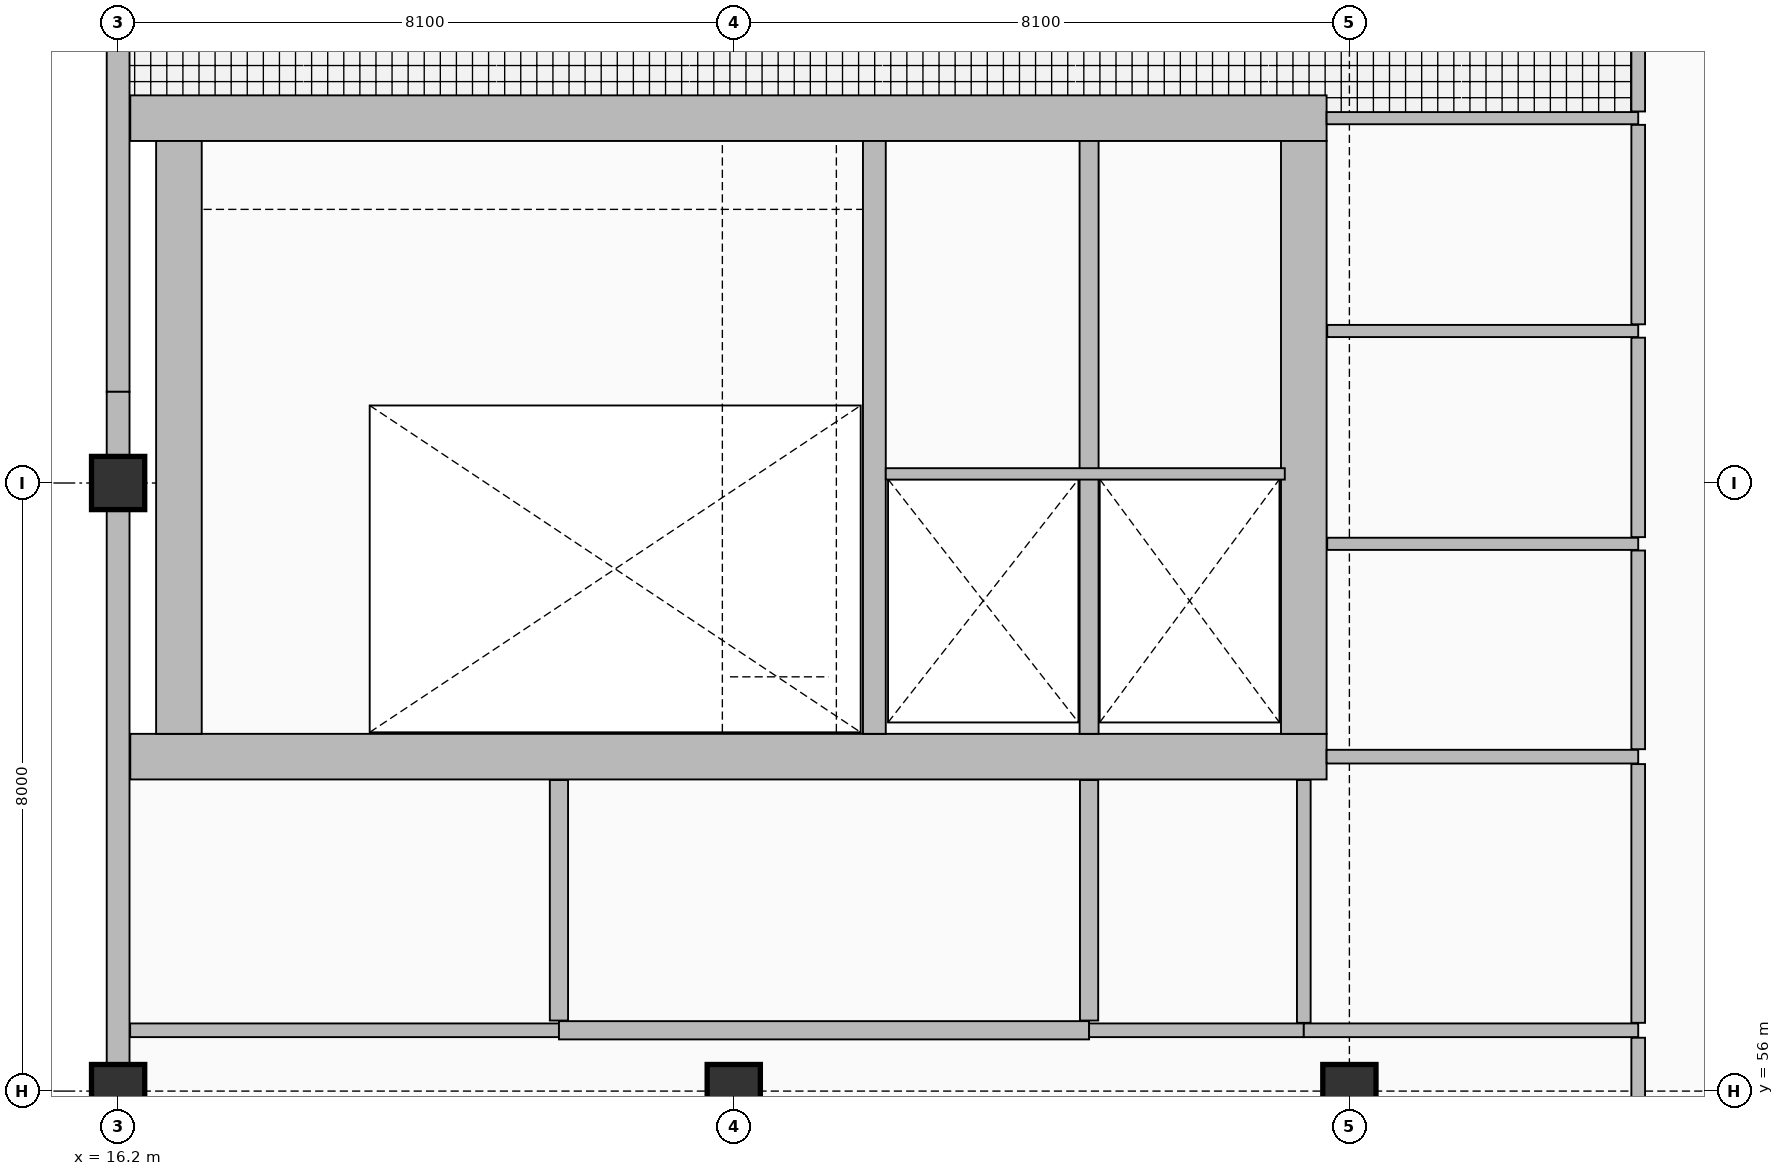
"""IFC4 building model, lengths in metres.
Left out: names, types, materials, properties, quantities, classifications, styles, units other than length and angle.
Written with IfcOpenShell. Run it as: python <this file> out.ifc"""

import sys

from ifc_helpers import new_model, si_unit, direction, frame, frame_2d, origin, origin_2d, place, context, subcontext, project, spatial, rectangle, extrude, element, fill, save


model = new_model("IFC4")
c1 = context("Model", 3, precision=1e-05, world=origin(), true_north=direction((0.0, 1.0)))
c2 = subcontext(c1, "Body", "Model", "MODEL_VIEW")
j1 = project(units=[si_unit("LENGTHUNIT", "METRE"), si_unit("PLANEANGLEUNIT", "RADIAN")], contexts=[c1])
p1 = place(None, origin())
s1 = spatial("IfcSite", under=j1, at=p1, CompositionType="ELEMENT")
p2 = place(p1, origin())
s2 = spatial("IfcBuilding", under=s1, at=p2, CompositionType="ELEMENT")
p3 = place(p2, frame((0.0, 0.0, 5.4)))
s3 = spatial("IfcBuildingStorey", under=s2, at=p3, CompositionType="ELEMENT", Elevation=5.4)
p4 = place(p3, frame((16.36, 60.4, 0.0), z_axis=(0.0, 0.0, 1.0), x_axis=(1.0, 0.0, 0.0)))
e1 = element("IfcWall", 1, at=p4, inside=s3, PredefinedType="SHEAR", context=c2, shape_type="SweptSolid", body=[
    extrude(rectangle(XDim=15.74, YDim=0.6, at=frame_2d((7.87, 0.0))), origin(), (0.0, 0.0, 1.0), 4.8),
])
p5 = place(p4, frame((1.39, 0.0, 0.0)))
e2 = element("IfcOpeningElement", 2, at=p5, cuts=e1, PredefinedType="OPENING", context=c2, shape_type="SweptSolid", body=[
    extrude(rectangle(XDim=1.15, YDim=2.25, at=frame_2d((0.575, 1.125))), frame((0.0, 0.31, 0.0), z_axis=(0.0, -1.0, 0.0), x_axis=(1.0, 0.0, 0.0)), (0.0, 0.0, 1.0), 0.62),
])
p6 = place(p4, frame((10.673, 0.0, 0.0)))
e3 = element("IfcOpeningElement", 3, at=p6, cuts=e1, PredefinedType="OPENING", context=c2, shape_type="SweptSolid", body=[
    extrude(rectangle(XDim=1.1, YDim=2.2, at=frame_2d((0.55, 1.1))), frame((0.0, 0.31, 0.0), z_axis=(0.0, -1.0, 0.0), x_axis=(1.0, 0.0, 0.0)), (0.0, 0.0, 1.0), 0.62),
])
p7 = place(p4, frame((13.387, 0.0, 0.0)))
e4 = element("IfcOpeningElement", 4, at=p7, cuts=e1, PredefinedType="OPENING", context=c2, shape_type="SweptSolid", body=[
    extrude(rectangle(XDim=1.1, YDim=2.2, at=frame_2d((0.55, 1.1))), frame((0.0, 0.31, 0.0), z_axis=(0.0, -1.0, 0.0), x_axis=(1.0, 0.0, 0.0)), (0.0, 0.0, 1.0), 0.62),
])
p8 = place(p3, frame((16.36, 68.8, 0.0), z_axis=(0.0, 0.0, 1.0), x_axis=(1.0, 0.0, 0.0)))
e5 = element("IfcWall", 5, at=p8, inside=s3, PredefinedType="SHEAR", context=c2, shape_type="SweptSolid", body=[
    extrude(rectangle(XDim=15.74, YDim=0.6, at=frame_2d((7.87, 0.0))), origin(), (0.0, 0.0, 1.0), 4.8),
])
for number, where, z_axis, x_axis in (
    (6, (17.0, 60.7, 0.0), (0.0, 0.0, 1.0), (0.0, 1.0, 0.0)),
    (7, (31.8, 60.7, 0.0), (0.0, 0.0, 1.0), (0.0, 1.0, 0.0)),
):
    element("IfcWall", number, at=place(p3, frame(where, z_axis=z_axis, x_axis=x_axis)), inside=s3, PredefinedType="SHEAR", context=c2, shape_type="SweptSolid", body=[
        extrude(rectangle(XDim=7.8, YDim=0.6, at=frame_2d((3.9, 0.0))), origin(), (0.0, 0.0, 1.0), 4.8),
    ])
p9 = place(p3, frame((26.15, 60.7, 0.0), z_axis=(0.0, 0.0, 1.0), x_axis=(0.0, 1.0, 0.0)))
e8 = element("IfcWall", 8, at=p9, inside=s3, PredefinedType="SHEAR", context=c2, shape_type="SweptSolid", body=[
    extrude(rectangle(XDim=7.8, YDim=0.3, at=frame_2d((3.9, 0.0))), origin(), (0.0, 0.0, 1.0), 4.8),
])
p10 = place(p3, frame((28.975, 60.7, 0.0), z_axis=(0.0, 0.0, 1.0), x_axis=(0.0, 1.0, 0.0)))
e9 = element("IfcWall", 9, at=p10, inside=s3, PredefinedType="SHEAR", context=c2, shape_type="SweptSolid", body=[
    extrude(rectangle(XDim=7.8, YDim=0.25, at=frame_2d((3.9, 0.0))), origin(), (0.0, 0.0, 1.0), 4.8),
])
for number, where, z_axis, x_axis in (
    (10, (16.2, 56.0, 0.0), (0.0, 0.0, 1.0), (1.0, 0.0, 0.0)),
    (11, (16.2, 64.0, 0.0), (0.0, 0.0, 1.0), (1.0, 0.0, 0.0)),
    (12, (24.3, 56.0, 0.0), (0.0, 0.0, 1.0), (1.0, 0.0, 0.0)),
    (13, (32.4, 56.0, 0.0), (0.0, 0.0, 1.0), (1.0, 0.0, 0.0)),
):
    element("IfcColumn", number, at=place(p3, frame(where, z_axis=z_axis, x_axis=x_axis)), inside=s3, PredefinedType="COLUMN", context=c2, shape_type="SweptSolid", body=[
        extrude(rectangle(XDim=0.7, YDim=0.7, at=origin_2d()), origin(), (0.0, 0.0, 1.0), 4.8),
    ])
p11 = place(p3, frame((16.2, 80.8, 0.0), z_axis=(0.0, 0.0, 1.0), x_axis=(0.0, -1.0, 0.0)))
e14 = element("IfcWall", 14, at=p11, inside=s3, PredefinedType="SOLIDWALL", context=c2, shape_type="SweptSolid", body=[
    extrude(rectangle(XDim=15.6, YDim=0.3, at=frame_2d((7.8, 0.0))), origin(), (0.0, 0.0, 1.0), 3.912),
])
p12 = place(p11, frame((4.5, 0.0, 0.95)))
e15 = element("IfcOpeningElement", 15, at=p12, cuts=e14, PredefinedType="OPENING", context=c2, shape_type="SweptSolid", body=[
    extrude(rectangle(XDim=1.35, YDim=1.8, at=frame_2d((0.675, 0.9))), frame((0.0, 0.16, 0.0), z_axis=(0.0, -1.0, 0.0), x_axis=(1.0, 0.0, 0.0)), (0.0, 0.0, 1.0), 0.32),
])
p13 = place(p3, frame((16.2, 65.2, 0.0), z_axis=(0.0, 0.0, 1.0), x_axis=(0.0, -1.0, 0.0)))
e16 = element("IfcWall", 16, at=p13, inside=s3, PredefinedType="SOLIDWALL", context=c2, shape_type="SweptSolid", body=[
    extrude(rectangle(XDim=15.6, YDim=0.3, at=frame_2d((7.8, 0.0))), origin(), (0.0, 0.0, 1.0), 3.912),
])
p14 = place(p3, frame((26.3, 64.12, 0.0), z_axis=(0.0, 0.0, 1.0), x_axis=(1.0, 0.0, 0.0)))
e17 = element("IfcWall", 17, at=p14, inside=s3, PredefinedType="PARTITIONING", context=c2, shape_type="SweptSolid", body=[
    extrude(rectangle(XDim=5.25, YDim=0.15, at=frame_2d((2.625, 0.0))), origin(), (0.0, 0.0, 1.0), 4.52),
])
p15 = place(p3, frame((16.358, 56.8, 0.0), z_axis=(0.0, 0.0, 1.0), x_axis=(1.0, 0.0, 0.0)))
e18 = element("IfcWall", 18, at=p15, inside=s3, PredefinedType="PARTITIONING", context=c2, shape_type="SweptSolid", body=[
    extrude(rectangle(XDim=5.642, YDim=0.18, at=frame_2d((2.821, 0.0))), origin(), (0.0, 0.0, 1.0), 4.52),
])
p16 = place(p15, frame((2.271, 0.0, 0.0)))
e19 = element("IfcOpeningElement", 19, at=p16, cuts=e18, PredefinedType="OPENING", context=c2, shape_type="SweptSolid", body=[
    extrude(rectangle(XDim=1.1, YDim=2.2, at=frame_2d((0.55, 1.1))), frame((0.0, 0.1, 0.0), z_axis=(0.0, -1.0, 0.0), x_axis=(1.0, 0.0, 0.0)), (0.0, 0.0, 1.0), 0.2),
])
p17 = place(p3, frame((22.0, 56.8, 0.0), z_axis=(0.0, 0.0, 1.0), x_axis=(1.0, 0.0, 0.0)))
e20 = element("IfcWall", 20, at=p17, inside=s3, PredefinedType="PARTITIONING", context=c2, shape_type="SweptSolid", body=[
    extrude(rectangle(XDim=6.975, YDim=0.24, at=frame_2d((3.488, 0.0))), origin(), (0.0, 0.0, 1.0), 4.52),
])
p18 = place(p17, frame((4.003, 0.0, 0.0)))
e21 = element("IfcOpeningElement", 21, at=p18, cuts=e20, PredefinedType="OPENING", context=c2, shape_type="SweptSolid", body=[
    extrude(rectangle(XDim=1.2, YDim=2.3, at=frame_2d((0.6, 1.15))), frame((0.0, 0.13, 0.0), z_axis=(0.0, -1.0, 0.0), x_axis=(1.0, 0.0, 0.0)), (0.0, 0.0, 1.0), 0.26),
])
p19 = place(p3, frame((28.975, 56.8, 0.0), z_axis=(0.0, 0.0, 1.0), x_axis=(1.0, 0.0, 0.0)))
e22 = element("IfcWall", 22, at=p19, inside=s3, PredefinedType="PARTITIONING", context=c2, shape_type="SweptSolid", body=[
    extrude(rectangle(XDim=2.825, YDim=0.18, at=frame_2d((1.413, 0.0))), origin(), (0.0, 0.0, 1.0), 4.52),
])
p20 = place(p19, frame((0.636, 0.0, 0.0)))
e23 = element("IfcOpeningElement", 23, at=p20, cuts=e22, PredefinedType="OPENING", context=c2, shape_type="SweptSolid", body=[
    extrude(rectangle(XDim=1.1, YDim=2.2, at=frame_2d((0.55, 1.1))), frame((0.0, 0.1, 0.0), z_axis=(0.0, -1.0, 0.0), x_axis=(1.0, 0.0, 0.0)), (0.0, 0.0, 1.0), 0.2),
])
p21 = place(p3, frame((31.8, 56.8, 0.0), z_axis=(0.0, 0.0, 1.0), x_axis=(1.0, 0.0, 0.0)))
e24 = element("IfcWall", 24, at=p21, inside=s3, PredefinedType="PARTITIONING", context=c2, shape_type="SweptSolid", body=[
    extrude(rectangle(XDim=4.4, YDim=0.18, at=frame_2d((2.2, 0.0))), origin(), (0.0, 0.0, 1.0), 4.52),
])
p22 = place(p3, frame((32.1, 60.4, 0.0), z_axis=(0.0, 0.0, 1.0), x_axis=(1.0, 0.0, 0.0)))
e25 = element("IfcWall", 25, at=p22, inside=s3, PredefinedType="PARTITIONING", context=c2, shape_type="SweptSolid", body=[
    extrude(rectangle(XDim=4.1, YDim=0.18, at=frame_2d((2.05, 0.0))), origin(), (0.0, 0.0, 1.0), 4.52),
])
for number, where, z_axis, x_axis in (
    (26, (32.108, 63.2, 0.0), (0.0, 0.0, 1.0), (1.0, 0.0, 0.0)),
    (27, (32.108, 66.0, 0.0), (0.0, 0.0, 1.0), (1.0, 0.0, 0.0)),
):
    element("IfcWall", number, at=place(p3, frame(where, z_axis=z_axis, x_axis=x_axis)), inside=s3, PredefinedType="PARTITIONING", context=c2, shape_type="SweptSolid", body=[
        extrude(rectangle(XDim=4.092, YDim=0.16, at=frame_2d((2.046, 0.0))), origin(), (0.0, 0.0, 1.0), 4.52),
    ])
p23 = place(p3, frame((32.1, 68.8, 0.0), z_axis=(0.0, 0.0, 1.0), x_axis=(1.0, 0.0, 0.0)))
e28 = element("IfcWall", 28, at=p23, inside=s3, PredefinedType="PARTITIONING", context=c2, shape_type="SweptSolid", body=[
    extrude(rectangle(XDim=4.1, YDim=0.16, at=frame_2d((2.05, 0.0))), origin(), (0.0, 0.0, 1.0), 4.52),
])
p24 = place(p3, frame((22.0, 56.928, 0.0), z_axis=(0.0, 0.0, 1.0), x_axis=(0.0, 1.0, 0.0)))
e29 = element("IfcWall", 29, at=p24, inside=s3, PredefinedType="PARTITIONING", context=c2, shape_type="SweptSolid", body=[
    extrude(rectangle(XDim=3.164, YDim=0.24, at=frame_2d((1.582, 0.0))), origin(), (0.0, 0.0, 1.0), 4.52),
])
p25 = place(p24, frame((1.082, 0.0, 0.0)))
e30 = element("IfcOpeningElement", 30, at=p25, cuts=e29, PredefinedType="OPENING", context=c2, shape_type="SweptSolid", body=[
    extrude(rectangle(XDim=1.0, YDim=2.2, at=frame_2d((0.5, 1.1))), frame((0.0, 0.13, 0.0), z_axis=(0.0, -1.0, 0.0), x_axis=(1.0, 0.0, 0.0)), (0.0, 0.0, 1.0), 0.26),
])
p26 = place(p3, frame((28.975, 56.928, 0.0), z_axis=(0.0, 0.0, 1.0), x_axis=(0.0, 1.0, 0.0)))
e31 = element("IfcWall", 31, at=p26, inside=s3, PredefinedType="PARTITIONING", context=c2, shape_type="SweptSolid", body=[
    extrude(rectangle(XDim=3.164, YDim=0.24, at=frame_2d((1.582, 0.0))), origin(), (0.0, 0.0, 1.0), 4.52),
])
p27 = place(p3, frame((31.8, 56.898, 0.0), z_axis=(0.0, 0.0, 1.0), x_axis=(0.0, 1.0, 0.0)))
e32 = element("IfcWall", 32, at=p27, inside=s3, PredefinedType="PARTITIONING", context=c2, shape_type="SweptSolid", body=[
    extrude(rectangle(XDim=3.194, YDim=0.18, at=frame_2d((1.597, 0.0))), origin(), (0.0, 0.0, 1.0), 4.52),
])
p28 = place(p3, frame((36.2, 53.298, 0.0), z_axis=(0.0, 0.0, 1.0), x_axis=(0.0, 1.0, 0.0)))
e33 = element("IfcWall", 33, at=p28, inside=s3, PredefinedType="PARTITIONING", context=c2, shape_type="SweptSolid", body=[
    extrude(rectangle(XDim=3.404, YDim=0.18, at=frame_2d((1.702, 0.0))), origin(), (0.0, 0.0, 1.0), 4.158),
])
p29 = place(p28, frame((1.152, 0.0, 0.0)))
e34 = element("IfcOpeningElement", 34, at=p29, cuts=e33, PredefinedType="OPENING", context=c2, shape_type="SweptSolid", body=[
    extrude(rectangle(XDim=1.1, YDim=2.2, at=frame_2d((0.55, 1.1))), frame((0.0, 0.1, 0.0), z_axis=(0.0, -1.0, 0.0), x_axis=(1.0, 0.0, 0.0)), (0.0, 0.0, 1.0), 0.2),
])
p30 = place(p3, frame((36.2, 56.898, 0.0), z_axis=(0.0, 0.0, 1.0), x_axis=(0.0, 1.0, 0.0)))
e35 = element("IfcWall", 35, at=p30, inside=s3, PredefinedType="PARTITIONING", context=c2, shape_type="SweptSolid", body=[
    extrude(rectangle(XDim=3.404, YDim=0.18, at=frame_2d((1.702, 0.0))), origin(), (0.0, 0.0, 1.0), 4.52),
])
p31 = place(p30, frame((1.202, 0.0, 0.0)))
e36 = element("IfcOpeningElement", 36, at=p31, cuts=e35, PredefinedType="OPENING", context=c2, shape_type="SweptSolid", body=[
    extrude(rectangle(XDim=1.0, YDim=2.15, at=frame_2d((0.5, 1.075))), frame((0.0, 0.1, 0.0), z_axis=(0.0, -1.0, 0.0), x_axis=(1.0, 0.0, 0.0)), (0.0, 0.0, 1.0), 0.2),
])
p32 = place(p3, frame((36.2, 60.498, 0.0), z_axis=(0.0, 0.0, 1.0), x_axis=(0.0, 1.0, 0.0)))
e37 = element("IfcWall", 37, at=p32, inside=s3, PredefinedType="PARTITIONING", context=c2, shape_type="SweptSolid", body=[
    extrude(rectangle(XDim=2.614, YDim=0.18, at=frame_2d((1.307, 0.0))), origin(), (0.0, 0.0, 1.0), 4.52),
])
p33 = place(p32, frame((0.832, 0.0, 0.0)))
e38 = element("IfcOpeningElement", 38, at=p33, cuts=e37, PredefinedType="OPENING", context=c2, shape_type="SweptSolid", body=[
    extrude(rectangle(XDim=0.95, YDim=2.1, at=frame_2d((0.475, 1.05))), frame((0.0, 0.1, 0.0), z_axis=(0.0, -1.0, 0.0), x_axis=(1.0, 0.0, 0.0)), (0.0, 0.0, 1.0), 0.2),
])
p34 = place(p3, frame((36.2, 63.288, 0.0), z_axis=(0.0, 0.0, 1.0), x_axis=(0.0, 1.0, 0.0)))
e39 = element("IfcWall", 39, at=p34, inside=s3, PredefinedType="PARTITIONING", context=c2, shape_type="SweptSolid", body=[
    extrude(rectangle(XDim=2.624, YDim=0.18, at=frame_2d((1.312, 0.0))), origin(), (0.0, 0.0, 1.0), 4.52),
])
p35 = place(p34, frame((0.837, 0.0, 0.0)))
e40 = element("IfcOpeningElement", 40, at=p35, cuts=e39, PredefinedType="OPENING", context=c2, shape_type="SweptSolid", body=[
    extrude(rectangle(XDim=0.95, YDim=2.1, at=frame_2d((0.475, 1.05))), frame((0.0, 0.1, 0.0), z_axis=(0.0, -1.0, 0.0), x_axis=(1.0, 0.0, 0.0)), (0.0, 0.0, 1.0), 0.2),
])
p36 = place(p3, frame((36.2, 66.088, 0.0), z_axis=(0.0, 0.0, 1.0), x_axis=(0.0, 1.0, 0.0)))
e41 = element("IfcWall", 41, at=p36, inside=s3, PredefinedType="PARTITIONING", context=c2, shape_type="SweptSolid", body=[
    extrude(rectangle(XDim=2.624, YDim=0.18, at=frame_2d((1.312, 0.0))), origin(), (0.0, 0.0, 1.0), 4.52),
])
p37 = place(p36, frame((0.812, 0.0, 0.0)))
e42 = element("IfcOpeningElement", 42, at=p37, cuts=e41, PredefinedType="OPENING", context=c2, shape_type="SweptSolid", body=[
    extrude(rectangle(XDim=1.0, YDim=2.15, at=frame_2d((0.5, 1.075))), frame((0.0, 0.1, 0.0), z_axis=(0.0, -1.0, 0.0), x_axis=(1.0, 0.0, 0.0)), (0.0, 0.0, 1.0), 0.2),
])
p38 = place(p3, frame((36.2, 68.888, 0.0), z_axis=(0.0, 0.0, 1.0), x_axis=(0.0, 1.0, 0.0)))
e43 = element("IfcWall", 43, at=p38, inside=s3, PredefinedType="PARTITIONING", context=c2, shape_type="SweptSolid", body=[
    extrude(rectangle(XDim=14.024, YDim=0.18, at=frame_2d((7.012, 0.0))), origin(), (0.0, 0.0, 1.0), 4.165),
])
p39 = place(p38, frame((6.512, 0.0, 0.0)))
e44 = element("IfcOpeningElement", 44, at=p39, cuts=e43, PredefinedType="OPENING", context=c2, shape_type="SweptSolid", body=[
    extrude(rectangle(XDim=1.0, YDim=2.2, at=frame_2d((0.5, 1.1))), frame((0.0, 0.1, 0.0), z_axis=(0.0, -1.0, 0.0), x_axis=(1.0, 0.0, 0.0)), (0.0, 0.0, 1.0), 0.2),
])
p40 = place(p5, origin())
e45 = element("IfcDoor", 45, at=p40, inside=s3, OperationType="SINGLE_SWING_LEFT", PredefinedType="DOOR", context=c2, shape_type="SweptSolid", body=[
    extrude(rectangle(XDim=1.15, YDim=2.25, at=frame_2d((0.575, 1.125))), frame((0.0, 0.025, 0.0), z_axis=(0.0, -1.0, 0.0), x_axis=(1.0, 0.0, 0.0)), (0.0, 0.0, 1.0), 0.05),
])
fill(e2, e45)
p41 = place(p6, frame((1.1, 0.0, 0.0), z_axis=(0.0, 0.0, 1.0), x_axis=(-1.0, 0.0, 0.0)))
e46 = element("IfcDoor", 46, at=p41, inside=s3, OperationType="DOUBLE_DOOR_SLIDING", PredefinedType="DOOR", context=c2, shape_type="SweptSolid", body=[
    extrude(rectangle(XDim=1.1, YDim=2.2, at=frame_2d((0.55, 1.1))), frame((0.0, 0.025, 0.0), z_axis=(0.0, -1.0, 0.0), x_axis=(1.0, 0.0, 0.0)), (0.0, 0.0, 1.0), 0.05),
])
fill(e3, e46)
p42 = place(p7, frame((1.1, 0.0, 0.0), z_axis=(0.0, 0.0, 1.0), x_axis=(-1.0, 0.0, 0.0)))
e47 = element("IfcDoor", 47, at=p42, inside=s3, OperationType="DOUBLE_DOOR_SLIDING", PredefinedType="DOOR", context=c2, shape_type="SweptSolid", body=[
    extrude(rectangle(XDim=1.1, YDim=2.2, at=frame_2d((0.55, 1.1))), frame((0.0, 0.025, 0.0), z_axis=(0.0, -1.0, 0.0), x_axis=(1.0, 0.0, 0.0)), (0.0, 0.0, 1.0), 0.05),
])
fill(e4, e47)
p43 = place(p16, frame((1.1, 0.0, 0.0), z_axis=(0.0, 0.0, 1.0), x_axis=(-1.0, 0.0, 0.0)))
e48 = element("IfcDoor", 48, at=p43, inside=s3, OperationType="SINGLE_SWING_RIGHT", PredefinedType="DOOR", context=c2, shape_type="SweptSolid", body=[
    extrude(rectangle(XDim=1.1, YDim=2.2, at=frame_2d((0.55, 1.1))), frame((0.0, 0.025, 0.0), z_axis=(0.0, -1.0, 0.0), x_axis=(1.0, 0.0, 0.0)), (0.0, 0.0, 1.0), 0.05),
])
fill(e19, e48)
p44 = place(p18, frame((1.2, 0.0, 0.0), z_axis=(0.0, 0.0, 1.0), x_axis=(-1.0, 0.0, 0.0)))
e49 = element("IfcDoor", 49, at=p44, inside=s3, OperationType="SINGLE_SWING_LEFT", PredefinedType="DOOR", context=c2, shape_type="SweptSolid", body=[
    extrude(rectangle(XDim=1.2, YDim=2.3, at=frame_2d((0.6, 1.15))), frame((0.0, 0.025, 0.0), z_axis=(0.0, -1.0, 0.0), x_axis=(1.0, 0.0, 0.0)), (0.0, 0.0, 1.0), 0.05),
])
fill(e21, e49)
p45 = place(p20, frame((1.1, 0.0, 0.0), z_axis=(0.0, 0.0, 1.0), x_axis=(-1.0, 0.0, 0.0)))
e50 = element("IfcDoor", 50, at=p45, inside=s3, OperationType="SINGLE_SWING_LEFT", PredefinedType="DOOR", context=c2, shape_type="SweptSolid", body=[
    extrude(rectangle(XDim=1.1, YDim=2.2, at=frame_2d((0.55, 1.1))), frame((0.0, 0.025, 0.0), z_axis=(0.0, -1.0, 0.0), x_axis=(1.0, 0.0, 0.0)), (0.0, 0.0, 1.0), 0.05),
])
fill(e23, e50)
p46 = place(p25, origin())
e51 = element("IfcDoor", 51, at=p46, inside=s3, OperationType="SINGLE_SWING_LEFT", PredefinedType="DOOR", context=c2, shape_type="SweptSolid", body=[
    extrude(rectangle(XDim=1.0, YDim=2.2, at=frame_2d((0.5, 1.1))), frame((0.0, 0.025, 0.0), z_axis=(0.0, -1.0, 0.0), x_axis=(1.0, 0.0, 0.0)), (0.0, 0.0, 1.0), 0.05),
])
fill(e30, e51)
p47 = place(p31, origin())
e52 = element("IfcDoor", 52, at=p47, inside=s3, OperationType="SINGLE_SWING_RIGHT", PredefinedType="DOOR", context=c2, shape_type="SweptSolid", body=[
    extrude(rectangle(XDim=1.0, YDim=2.15, at=frame_2d((0.5, 1.075))), frame((0.0, 0.025, 0.0), z_axis=(0.0, -1.0, 0.0), x_axis=(1.0, 0.0, 0.0)), (0.0, 0.0, 1.0), 0.05),
])
fill(e36, e52)
p48 = place(p33, origin())
e53 = element("IfcDoor", 53, at=p48, inside=s3, OperationType="SINGLE_SWING_LEFT", PredefinedType="DOOR", context=c2, shape_type="SweptSolid", body=[
    extrude(rectangle(XDim=0.95, YDim=2.1, at=frame_2d((0.475, 1.05))), frame((0.0, 0.025, 0.0), z_axis=(0.0, -1.0, 0.0), x_axis=(1.0, 0.0, 0.0)), (0.0, 0.0, 1.0), 0.05),
])
fill(e38, e53)
p49 = place(p35, origin())
e54 = element("IfcDoor", 54, at=p49, inside=s3, OperationType="SINGLE_SWING_RIGHT", PredefinedType="DOOR", context=c2, shape_type="SweptSolid", body=[
    extrude(rectangle(XDim=0.95, YDim=2.1, at=frame_2d((0.475, 1.05))), frame((0.0, 0.025, 0.0), z_axis=(0.0, -1.0, 0.0), x_axis=(1.0, 0.0, 0.0)), (0.0, 0.0, 1.0), 0.05),
])
fill(e40, e54)
p50 = place(p37, origin())
e55 = element("IfcDoor", 55, at=p50, inside=s3, OperationType="SINGLE_SWING_LEFT", PredefinedType="DOOR", context=c2, shape_type="SweptSolid", body=[
    extrude(rectangle(XDim=1.0, YDim=2.15, at=frame_2d((0.5, 1.075))), frame((0.0, 0.025, 0.0), z_axis=(0.0, -1.0, 0.0), x_axis=(1.0, 0.0, 0.0)), (0.0, 0.0, 1.0), 0.05),
])
fill(e42, e55)
save(model, sys.argv[1])
